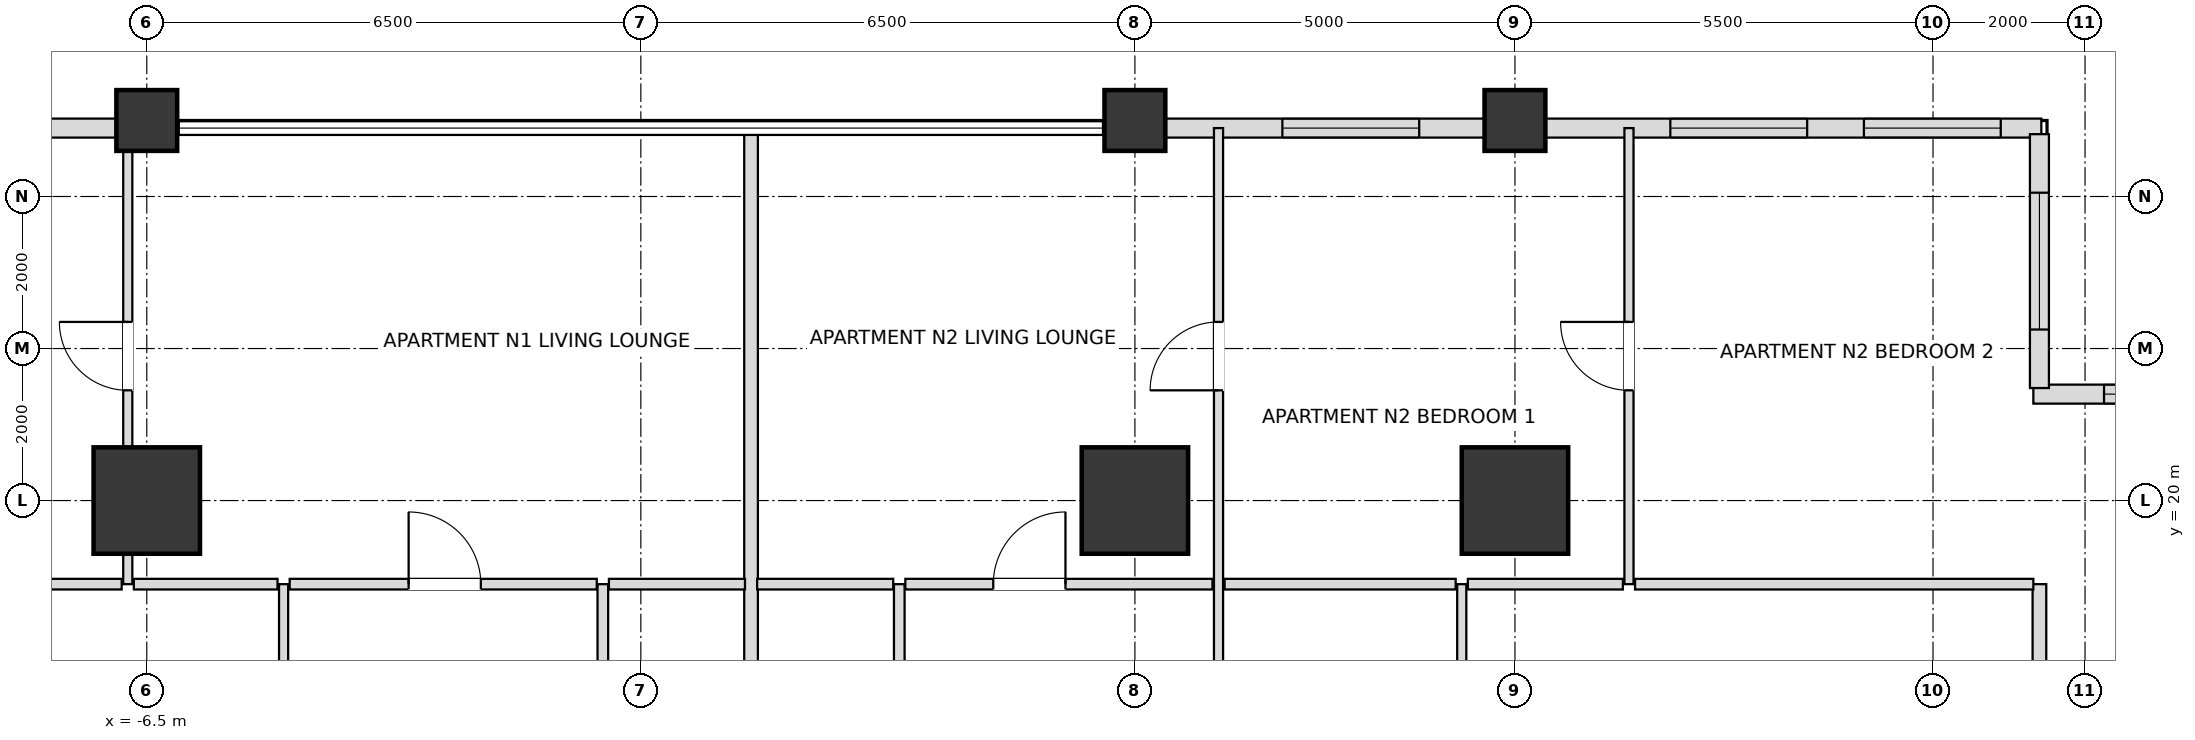
"""IFC4 building model, lengths in metres.
Left out: names, types, materials, properties, quantities, classifications, styles, units other than length and angle.
Written with IfcOpenShell. Run it as: python <this file> out.ifc"""

import sys

from ifc_helpers import new_model, si_unit, direction, frame, frame_2d, origin, origin_2d, place, context, subcontext, project, spatial, rectangle, extrude, element, fill, save


model = new_model("IFC4")
c1 = context("Model", 3, precision=1e-05, world=origin(), true_north=direction((0.0, 1.0)))
c2 = subcontext(c1, "Body", "Model", "MODEL_VIEW")
j1 = project(units=[si_unit("LENGTHUNIT", "METRE"), si_unit("PLANEANGLEUNIT", "RADIAN")], contexts=[c1])
p1 = place(None, origin())
s1 = spatial("IfcSite", under=j1, at=p1, CompositionType="ELEMENT")
p2 = place(p1, origin())
s2 = spatial("IfcBuilding", under=s1, at=p2, CompositionType="ELEMENT")
p3 = place(p2, frame((0.0, 0.0, 32.4)))
s3 = spatial("IfcBuildingStorey", under=s2, at=p3, CompositionType="ELEMENT", Elevation=32.4)
for number, where, z_axis, x_axis in (
    (1, (11.5, 20.0, 0.0), (0.0, 0.0, 1.0), (1.0, 0.0, 0.0)),
    (2, (6.5, 20.0, 0.0), (0.0, 0.0, 1.0), (1.0, 0.0, 0.0)),
    (3, (-6.5, 20.0, 0.0), (0.0, 0.0, 1.0), (1.0, 0.0, 0.0)),
):
    element("IfcColumn", number, at=place(p3, frame(where, z_axis=z_axis, x_axis=x_axis)), inside=s3, PredefinedType="USERDEFINED", context=c2, shape_type="SweptSolid", body=[
        extrude(rectangle(XDim=1.4, YDim=1.4, at=origin_2d()), origin(), (0.0, 0.0, 1.0), 3.6),
    ])
for number, where, z_axis, x_axis in (
    (4, (-6.5, 25.0, 0.0), (0.0, 0.0, 1.0), (1.0, 0.0, 0.0)),
    (5, (6.5, 25.0, 0.0), (0.0, 0.0, 1.0), (1.0, 0.0, 0.0)),
    (6, (11.5, 25.0, 0.0), (0.0, 0.0, 1.0), (1.0, 0.0, 0.0)),
):
    element("IfcColumn", number, at=place(p3, frame(where, z_axis=z_axis, x_axis=x_axis)), inside=s3, PredefinedType="COLUMN", context=c2, shape_type="SweptSolid", body=[
        extrude(rectangle(XDim=0.8, YDim=0.8, at=origin_2d()), origin(), (0.0, 0.0, 1.0), 3.6),
    ])
p4 = place(p3, frame((18.425, 24.9, 0.0), z_axis=(0.0, 0.0, 1.0), x_axis=(-1.0, 0.0, 0.0)))
e7 = element("IfcWall", 7, at=p4, inside=s3, PredefinedType="SOLIDWALL", context=c2, shape_type="SweptSolid", body=[
    extrude(rectangle(XDim=6.53, YDim=0.25, at=frame_2d((3.265, 0.0))), origin(), (0.0, 0.0, 1.0), 2.736),
])
p5 = place(p4, frame((0.534, 0.0, 0.72)))
e8 = element("IfcOpeningElement", 8, at=p5, cuts=e7, PredefinedType="OPENING", context=c2, shape_type="SweptSolid", body=[
    extrude(rectangle(XDim=1.8, YDim=1.68, at=frame_2d((0.9, 0.84))), frame((0.0, 0.135, 0.0), z_axis=(0.0, -1.0, 0.0), x_axis=(1.0, 0.0, 0.0)), (0.0, 0.0, 1.0), 0.27),
])
p6 = place(p4, frame((3.081, 0.0, 0.72)))
e9 = element("IfcOpeningElement", 9, at=p6, cuts=e7, PredefinedType="OPENING", context=c2, shape_type="SweptSolid", body=[
    extrude(rectangle(XDim=1.8, YDim=1.68, at=frame_2d((0.9, 0.84))), frame((0.0, 0.135, 0.0), z_axis=(0.0, -1.0, 0.0), x_axis=(1.0, 0.0, 0.0)), (0.0, 0.0, 1.0), 0.27),
])
p7 = place(p3, frame((11.105, 24.9, 0.0), z_axis=(0.0, 0.0, 1.0), x_axis=(-1.0, 0.0, 0.0)))
e10 = element("IfcWall", 10, at=p7, inside=s3, PredefinedType="SOLIDWALL", context=c2, shape_type="SweptSolid", body=[
    extrude(rectangle(XDim=4.21, YDim=0.25, at=frame_2d((2.105, 0.0))), origin(), (0.0, 0.0, 1.0), 2.736),
])
p8 = place(p7, frame((0.865, 0.0, 0.72)))
e11 = element("IfcOpeningElement", 11, at=p8, cuts=e10, PredefinedType="OPENING", context=c2, shape_type="SweptSolid", body=[
    extrude(rectangle(XDim=1.8, YDim=1.68, at=frame_2d((0.9, 0.84))), frame((0.0, 0.135, 0.0), z_axis=(0.0, -1.0, 0.0), x_axis=(1.0, 0.0, 0.0)), (0.0, 0.0, 1.0), 0.27),
])
p9 = place(p3, frame((-6.895, 24.9, 0.0), z_axis=(0.0, 0.0, 1.0), x_axis=(-1.0, 0.0, 0.0)))
e12 = element("IfcWall", 12, at=p9, inside=s3, PredefinedType="SOLIDWALL", context=c2, shape_type="SweptSolid", body=[
    extrude(rectangle(XDim=4.21, YDim=0.25, at=frame_2d((2.105, 0.0))), origin(), (0.0, 0.0, 1.0), 2.736),
])
p10 = place(p9, frame((1.205, 0.0, 0.72)))
e13 = element("IfcOpeningElement", 13, at=p10, cuts=e12, PredefinedType="OPENING", context=c2, shape_type="SweptSolid", body=[
    extrude(rectangle(XDim=1.8, YDim=1.68, at=frame_2d((0.9, 0.84))), frame((0.0, 0.135, 0.0), z_axis=(0.0, -1.0, 0.0), x_axis=(1.0, 0.0, 0.0)), (0.0, 0.0, 1.0), 0.27),
])
p11 = place(p3, frame((21.98, 21.4, 0.0), z_axis=(0.0, 0.0, 1.0), x_axis=(-1.0, 0.0, 0.0)))
e14 = element("IfcWall", 14, at=p11, inside=s3, PredefinedType="SOLIDWALL", context=c2, shape_type="SweptSolid", body=[
    extrude(rectangle(XDim=3.66, YDim=0.25, at=frame_2d((1.83, 0.0))), origin(), (0.0, 0.0, 1.0), 2.736),
])
p12 = place(p11, frame((0.93, 0.0, 0.72)))
e15 = element("IfcOpeningElement", 15, at=p12, cuts=e14, PredefinedType="OPENING", context=c2, shape_type="SweptSolid", body=[
    extrude(rectangle(XDim=1.8, YDim=1.68, at=frame_2d((0.9, 0.84))), frame((0.0, 0.135, 0.0), z_axis=(0.0, -1.0, 0.0), x_axis=(1.0, 0.0, 0.0)), (0.0, 0.0, 1.0), 0.27),
])
p13 = place(p3, frame((18.4, 21.48, 0.0), z_axis=(0.0, 0.0, 1.0), x_axis=(0.0, 1.0, 0.0)))
e16 = element("IfcWall", 16, at=p13, inside=s3, PredefinedType="SOLIDWALL", context=c2, shape_type="SweptSolid", body=[
    extrude(rectangle(XDim=3.34, YDim=0.25, at=frame_2d((1.67, 0.0))), origin(), (0.0, 0.0, 1.0), 2.736),
])
p14 = place(p13, frame((0.77, 0.0, 0.72)))
e17 = element("IfcOpeningElement", 17, at=p14, cuts=e16, PredefinedType="OPENING", context=c2, shape_type="SweptSolid", body=[
    extrude(rectangle(XDim=1.8, YDim=1.68, at=frame_2d((0.9, 0.84))), frame((0.0, 0.135, 0.0), z_axis=(0.0, -1.0, 0.0), x_axis=(1.0, 0.0, 0.0)), (0.0, 0.0, 1.0), 0.27),
])
p15 = place(p3, frame((-6.75, 18.9, 0.0), z_axis=(0.0, 0.0, 1.0), x_axis=(0.0, 1.0, 0.0)))
e18 = element("IfcWall", 18, at=p15, inside=s3, PredefinedType="PARTITIONING", context=c2, shape_type="SweptSolid", body=[
    extrude(rectangle(XDim=6.0, YDim=0.12, at=frame_2d((3.0, 0.0))), origin(), (0.0, 0.0, 1.0), 2.816),
])
p16 = place(p15, frame((2.55, 0.0, 0.0)))
e19 = element("IfcOpeningElement", 19, at=p16, cuts=e18, PredefinedType="OPENING", context=c2, shape_type="SweptSolid", body=[
    extrude(rectangle(XDim=0.9, YDim=2.1, at=frame_2d((0.45, 1.05))), frame((0.0, 0.07, 0.0), z_axis=(0.0, -1.0, 0.0), x_axis=(1.0, 0.0, 0.0)), (0.0, 0.0, 1.0), 0.14),
])
p17 = place(p3, frame((-4.7, 9.3, 0.0), z_axis=(0.0, 0.0, 1.0), x_axis=(0.0, 1.0, 0.0)))
e20 = element("IfcWall", 20, at=p17, inside=s3, PredefinedType="PARTITIONING", context=c2, shape_type="SweptSolid", body=[
    extrude(rectangle(XDim=9.6, YDim=0.12, at=frame_2d((4.8, 0.0))), origin(), (0.0, 0.0, 1.0), 2.948),
])
p18 = place(p17, frame((4.325, 0.0, 0.0)))
e21 = element("IfcOpeningElement", 21, at=p18, cuts=e20, PredefinedType="OPENING", context=c2, shape_type="SweptSolid", body=[
    extrude(rectangle(XDim=0.95, YDim=2.1, at=frame_2d((0.475, 1.05))), frame((0.0, 0.07, 0.0), z_axis=(0.0, -1.0, 0.0), x_axis=(1.0, 0.0, 0.0)), (0.0, 0.0, 1.0), 0.14),
])
p19 = place(p3, frame((-0.5, 9.3, 0.0), z_axis=(0.0, 0.0, 1.0), x_axis=(0.0, 1.0, 0.0)))
e22 = element("IfcWall", 22, at=p19, inside=s3, PredefinedType="PARTITIONING", context=c2, shape_type="SweptSolid", body=[
    extrude(rectangle(XDim=9.6, YDim=0.14, at=frame_2d((4.8, 0.0))), origin(), (0.0, 0.0, 1.0), 2.948),
])
p20 = place(p19, frame((4.35, 0.0, 0.0)))
e23 = element("IfcOpeningElement", 23, at=p20, cuts=e22, PredefinedType="OPENING", context=c2, shape_type="SweptSolid", body=[
    extrude(rectangle(XDim=0.9, YDim=2.1, at=frame_2d((0.45, 1.05))), frame((0.0, 0.08, 0.0), z_axis=(0.0, -1.0, 0.0), x_axis=(1.0, 0.0, 0.0)), (0.0, 0.0, 1.0), 0.16),
])
p21 = place(p3, frame((1.45, 9.3, 0.0), z_axis=(0.0, 0.0, 1.0), x_axis=(0.0, 1.0, 0.0)))
e24 = element("IfcWall", 24, at=p21, inside=s3, PredefinedType="PARTITIONING", context=c2, shape_type="SweptSolid", body=[
    extrude(rectangle(XDim=15.6, YDim=0.18, at=frame_2d((7.8, 0.0))), origin(), (0.0, 0.0, 1.0), 2.816),
])
p22 = place(p3, frame((3.4, 9.3, 0.0), z_axis=(0.0, 0.0, 1.0), x_axis=(0.0, 1.0, 0.0)))
e25 = element("IfcWall", 25, at=p22, inside=s3, PredefinedType="PARTITIONING", context=c2, shape_type="SweptSolid", body=[
    extrude(rectangle(XDim=9.6, YDim=0.14, at=frame_2d((4.8, 0.0))), origin(), (0.0, 0.0, 1.0), 2.948),
])
p23 = place(p22, frame((4.35, 0.0, 0.0)))
e26 = element("IfcOpeningElement", 26, at=p23, cuts=e25, PredefinedType="OPENING", context=c2, shape_type="SweptSolid", body=[
    extrude(rectangle(XDim=0.9, YDim=2.1, at=frame_2d((0.45, 1.05))), frame((0.0, 0.08, 0.0), z_axis=(0.0, -1.0, 0.0), x_axis=(1.0, 0.0, 0.0)), (0.0, 0.0, 1.0), 0.16),
])
p24 = place(p3, frame((7.6, 9.3, 0.0), z_axis=(0.0, 0.0, 1.0), x_axis=(0.0, 1.0, 0.0)))
e27 = element("IfcWall", 27, at=p24, inside=s3, PredefinedType="PARTITIONING", context=c2, shape_type="SweptSolid", body=[
    extrude(rectangle(XDim=15.6, YDim=0.12, at=frame_2d((7.8, 0.0))), origin(), (0.0, 0.0, 1.0), 2.816),
])
p25 = place(p24, frame((4.325, 0.0, 0.0)))
e28 = element("IfcOpeningElement", 28, at=p25, cuts=e27, PredefinedType="OPENING", context=c2, shape_type="SweptSolid", body=[
    extrude(rectangle(XDim=0.95, YDim=2.1, at=frame_2d((0.475, 1.05))), frame((0.0, 0.07, 0.0), z_axis=(0.0, -1.0, 0.0), x_axis=(1.0, 0.0, 0.0)), (0.0, 0.0, 1.0), 0.14),
])
p26 = place(p24, frame((12.15, 0.0, 0.0)))
e29 = element("IfcOpeningElement", 29, at=p26, cuts=e27, PredefinedType="OPENING", context=c2, shape_type="SweptSolid", body=[
    extrude(rectangle(XDim=0.9, YDim=2.1, at=frame_2d((0.45, 1.05))), frame((0.0, 0.07, 0.0), z_axis=(0.0, -1.0, 0.0), x_axis=(1.0, 0.0, 0.0)), (0.0, 0.0, 1.0), 0.14),
])
p27 = place(p3, frame((10.8, 9.3, 0.0), z_axis=(0.0, 0.0, 1.0), x_axis=(0.0, 1.0, 0.0)))
e30 = element("IfcWall", 30, at=p27, inside=s3, PredefinedType="PARTITIONING", context=c2, shape_type="SweptSolid", body=[
    extrude(rectangle(XDim=9.6, YDim=0.12, at=frame_2d((4.8, 0.0))), origin(), (0.0, 0.0, 1.0), 2.816),
])
p28 = place(p27, frame((4.325, 0.0, 0.0)))
e31 = element("IfcOpeningElement", 31, at=p28, cuts=e30, PredefinedType="OPENING", context=c2, shape_type="SweptSolid", body=[
    extrude(rectangle(XDim=0.95, YDim=2.1, at=frame_2d((0.475, 1.05))), frame((0.0, 0.07, 0.0), z_axis=(0.0, -1.0, 0.0), x_axis=(1.0, 0.0, 0.0)), (0.0, 0.0, 1.0), 0.14),
])
p29 = place(p3, frame((13.0, 18.9, 0.0), z_axis=(0.0, 0.0, 1.0), x_axis=(0.0, 1.0, 0.0)))
e32 = element("IfcWall", 32, at=p29, inside=s3, PredefinedType="PARTITIONING", context=c2, shape_type="SweptSolid", body=[
    extrude(rectangle(XDim=6.0, YDim=0.12, at=frame_2d((3.0, 0.0))), origin(), (0.0, 0.0, 1.0), 2.736),
])
p30 = place(p29, frame((2.55, 0.0, 0.0)))
e33 = element("IfcOpeningElement", 33, at=p30, cuts=e32, PredefinedType="OPENING", context=c2, shape_type="SweptSolid", body=[
    extrude(rectangle(XDim=0.9, YDim=2.1, at=frame_2d((0.45, 1.05))), frame((0.0, 0.07, 0.0), z_axis=(0.0, -1.0, 0.0), x_axis=(1.0, 0.0, 0.0)), (0.0, 0.0, 1.0), 0.14),
])
p31 = place(p3, frame((18.4, 9.3, 0.0), z_axis=(0.0, 0.0, 1.0), x_axis=(0.0, 1.0, 0.0)))
e34 = element("IfcWall", 34, at=p31, inside=s3, PredefinedType="PARTITIONING", context=c2, shape_type="SweptSolid", body=[
    extrude(rectangle(XDim=9.6, YDim=0.18, at=frame_2d((4.8, 0.0))), origin(), (0.0, 0.0, 1.0), 2.736),
])
p32 = place(p3, frame((-7.82, 18.9, 0.0), z_axis=(0.0, 0.0, 1.0), x_axis=(1.0, 0.0, 0.0)))
e35 = element("IfcWall", 35, at=p32, inside=s3, PredefinedType="PARTITIONING", context=c2, shape_type="SweptSolid", body=[
    extrude(rectangle(XDim=0.99, YDim=0.14, at=frame_2d((0.495, 0.0))), origin(), (0.0, 0.0, 1.0), 3.38),
])
p33 = place(p3, frame((-6.67, 18.9, 0.0), z_axis=(0.0, 0.0, 1.0), x_axis=(1.0, 0.0, 0.0)))
e36 = element("IfcWall", 36, at=p33, inside=s3, PredefinedType="PARTITIONING", context=c2, shape_type="SweptSolid", body=[
    extrude(rectangle(XDim=1.89, YDim=0.14, at=frame_2d((0.945, 0.0))), origin(), (0.0, 0.0, 1.0), 2.816),
])
p34 = place(p3, frame((-4.62, 18.9, 0.0), z_axis=(0.0, 0.0, 1.0), x_axis=(1.0, 0.0, 0.0)))
e37 = element("IfcWall", 37, at=p34, inside=s3, PredefinedType="PARTITIONING", context=c2, shape_type="SweptSolid", body=[
    extrude(rectangle(XDim=4.04, YDim=0.14, at=frame_2d((2.02, 0.0))), origin(), (0.0, 0.0, 1.0), 3.38),
])
p35 = place(p34, frame((1.565, 0.0, 0.0)))
e38 = element("IfcOpeningElement", 38, at=p35, cuts=e37, PredefinedType="OPENING", context=c2, shape_type="SweptSolid", body=[
    extrude(rectangle(XDim=0.95, YDim=2.1, at=frame_2d((0.475, 1.05))), frame((0.0, 0.08, 0.0), z_axis=(0.0, -1.0, 0.0), x_axis=(1.0, 0.0, 0.0)), (0.0, 0.0, 1.0), 0.16),
])
for number, where, z_axis, x_axis in (
    (39, (-0.42, 18.9, 0.0), (0.0, 0.0, 1.0), (1.0, 0.0, 0.0)),
    (40, (1.53, 18.9, 0.0), (0.0, 0.0, 1.0), (1.0, 0.0, 0.0)),
):
    element("IfcWall", number, at=place(p3, frame(where, z_axis=z_axis, x_axis=x_axis)), inside=s3, PredefinedType="PARTITIONING", context=c2, shape_type="SweptSolid", body=[
        extrude(rectangle(XDim=1.79, YDim=0.14, at=frame_2d((0.895, 0.0))), origin(), (0.0, 0.0, 1.0), 3.38),
    ])
p36 = place(p3, frame((3.48, 18.9, 0.0), z_axis=(0.0, 0.0, 1.0), x_axis=(1.0, 0.0, 0.0)))
e41 = element("IfcWall", 41, at=p36, inside=s3, PredefinedType="PARTITIONING", context=c2, shape_type="SweptSolid", body=[
    extrude(rectangle(XDim=4.04, YDim=0.14, at=frame_2d((2.02, 0.0))), origin(), (0.0, 0.0, 1.0), 2.816),
])
p37 = place(p36, frame((1.156, 0.0, 0.0)))
e42 = element("IfcOpeningElement", 42, at=p37, cuts=e41, PredefinedType="OPENING", context=c2, shape_type="SweptSolid", body=[
    extrude(rectangle(XDim=0.95, YDim=2.1, at=frame_2d((0.475, 1.05))), frame((0.0, 0.08, 0.0), z_axis=(0.0, -1.0, 0.0), x_axis=(1.0, 0.0, 0.0)), (0.0, 0.0, 1.0), 0.16),
])
p38 = place(p3, frame((7.68, 18.9, 0.0), z_axis=(0.0, 0.0, 1.0), x_axis=(1.0, 0.0, 0.0)))
e43 = element("IfcWall", 43, at=p38, inside=s3, PredefinedType="PARTITIONING", context=c2, shape_type="SweptSolid", body=[
    extrude(rectangle(XDim=3.04, YDim=0.14, at=frame_2d((1.52, 0.0))), origin(), (0.0, 0.0, 1.0), 3.38),
])
p39 = place(p3, frame((10.88, 18.9, 0.0), z_axis=(0.0, 0.0, 1.0), x_axis=(1.0, 0.0, 0.0)))
e44 = element("IfcWall", 44, at=p39, inside=s3, PredefinedType="PARTITIONING", context=c2, shape_type="SweptSolid", body=[
    extrude(rectangle(XDim=2.04, YDim=0.14, at=frame_2d((1.02, 0.0))), origin(), (0.0, 0.0, 1.0), 2.736),
])
p40 = place(p3, frame((13.08, 18.9, 0.0), z_axis=(0.0, 0.0, 1.0), x_axis=(1.0, 0.0, 0.0)))
e45 = element("IfcWall", 45, at=p40, inside=s3, PredefinedType="PARTITIONING", context=c2, shape_type="SweptSolid", body=[
    extrude(rectangle(XDim=5.24, YDim=0.14, at=frame_2d((2.62, 0.0))), origin(), (0.0, 0.0, 1.0), 2.736),
])
p41 = place(p5, origin())
e46 = element("IfcWindow", 46, at=p41, inside=s3, PartitioningType="SINGLE_PANEL", PredefinedType="WINDOW", context=c2, shape_type="SweptSolid", body=[
    extrude(rectangle(XDim=1.8, YDim=1.68, at=frame_2d((0.9, 0.84))), frame((0.0, 0.03, 0.0), z_axis=(0.0, -1.0, 0.0), x_axis=(1.0, 0.0, 0.0)), (0.0, 0.0, 1.0), 0.06),
])
fill(e8, e46)
p42 = place(p6, origin())
e47 = element("IfcWindow", 47, at=p42, inside=s3, PartitioningType="SINGLE_PANEL", PredefinedType="WINDOW", context=c2, shape_type="SweptSolid", body=[
    extrude(rectangle(XDim=1.8, YDim=1.68, at=frame_2d((0.9, 0.84))), frame((0.0, 0.03, 0.0), z_axis=(0.0, -1.0, 0.0), x_axis=(1.0, 0.0, 0.0)), (0.0, 0.0, 1.0), 0.06),
])
fill(e9, e47)
p43 = place(p8, origin())
e48 = element("IfcWindow", 48, at=p43, inside=s3, PartitioningType="SINGLE_PANEL", PredefinedType="WINDOW", context=c2, shape_type="SweptSolid", body=[
    extrude(rectangle(XDim=1.8, YDim=1.68, at=frame_2d((0.9, 0.84))), frame((0.0, 0.03, 0.0), z_axis=(0.0, -1.0, 0.0), x_axis=(1.0, 0.0, 0.0)), (0.0, 0.0, 1.0), 0.06),
])
fill(e11, e48)
p44 = place(p12, origin())
e49 = element("IfcWindow", 49, at=p44, inside=s3, PartitioningType="SINGLE_PANEL", PredefinedType="WINDOW", context=c2, shape_type="SweptSolid", body=[
    extrude(rectangle(XDim=1.8, YDim=1.68, at=frame_2d((0.9, 0.84))), frame((0.0, 0.03, 0.0), z_axis=(0.0, -1.0, 0.0), x_axis=(1.0, 0.0, 0.0)), (0.0, 0.0, 1.0), 0.06),
])
fill(e15, e49)
p45 = place(p14, origin())
e50 = element("IfcWindow", 50, at=p45, inside=s3, PartitioningType="SINGLE_PANEL", PredefinedType="WINDOW", context=c2, shape_type="SweptSolid", body=[
    extrude(rectangle(XDim=1.8, YDim=1.68, at=frame_2d((0.9, 0.84))), frame((0.0, 0.03, 0.0), z_axis=(0.0, -1.0, 0.0), x_axis=(1.0, 0.0, 0.0)), (0.0, 0.0, 1.0), 0.06),
])
fill(e17, e50)
p46 = place(p35, origin())
e51 = element("IfcDoor", 51, at=p46, inside=s3, OperationType="SINGLE_SWING_LEFT", PredefinedType="DOOR", context=c2, shape_type="SweptSolid", body=[
    extrude(rectangle(XDim=0.95, YDim=2.1, at=frame_2d((0.475, 1.05))), frame((0.0, 0.025, 0.0), z_axis=(0.0, -1.0, 0.0), x_axis=(1.0, 0.0, 0.0)), (0.0, 0.0, 1.0), 0.05),
])
fill(e38, e51)
p47 = place(p16, origin())
e52 = element("IfcDoor", 52, at=p47, inside=s3, OperationType="SINGLE_SWING_RIGHT", PredefinedType="DOOR", context=c2, shape_type="SweptSolid", body=[
    extrude(rectangle(XDim=0.9, YDim=2.1, at=frame_2d((0.45, 1.05))), frame((0.0, 0.025, 0.0), z_axis=(0.0, -1.0, 0.0), x_axis=(1.0, 0.0, 0.0)), (0.0, 0.0, 1.0), 0.05),
])
fill(e19, e52)
p48 = place(p37, origin())
e53 = element("IfcDoor", 53, at=p48, inside=s3, OperationType="SINGLE_SWING_RIGHT", PredefinedType="DOOR", context=c2, shape_type="SweptSolid", body=[
    extrude(rectangle(XDim=0.95, YDim=2.1, at=frame_2d((0.475, 1.05))), frame((0.0, 0.025, 0.0), z_axis=(0.0, -1.0, 0.0), x_axis=(1.0, 0.0, 0.0)), (0.0, 0.0, 1.0), 0.05),
])
fill(e42, e53)
p49 = place(p26, origin())
e54 = element("IfcDoor", 54, at=p49, inside=s3, OperationType="SINGLE_SWING_LEFT", PredefinedType="DOOR", context=c2, shape_type="SweptSolid", body=[
    extrude(rectangle(XDim=0.9, YDim=2.1, at=frame_2d((0.45, 1.05))), frame((0.0, 0.025, 0.0), z_axis=(0.0, -1.0, 0.0), x_axis=(1.0, 0.0, 0.0)), (0.0, 0.0, 1.0), 0.05),
])
fill(e29, e54)
p50 = place(p30, origin())
e55 = element("IfcDoor", 55, at=p50, inside=s3, OperationType="SINGLE_SWING_RIGHT", PredefinedType="DOOR", context=c2, shape_type="SweptSolid", body=[
    extrude(rectangle(XDim=0.9, YDim=2.1, at=frame_2d((0.45, 1.05))), frame((0.0, 0.025, 0.0), z_axis=(0.0, -1.0, 0.0), x_axis=(1.0, 0.0, 0.0)), (0.0, 0.0, 1.0), 0.05),
])
fill(e33, e55)
save(model, sys.argv[1])
